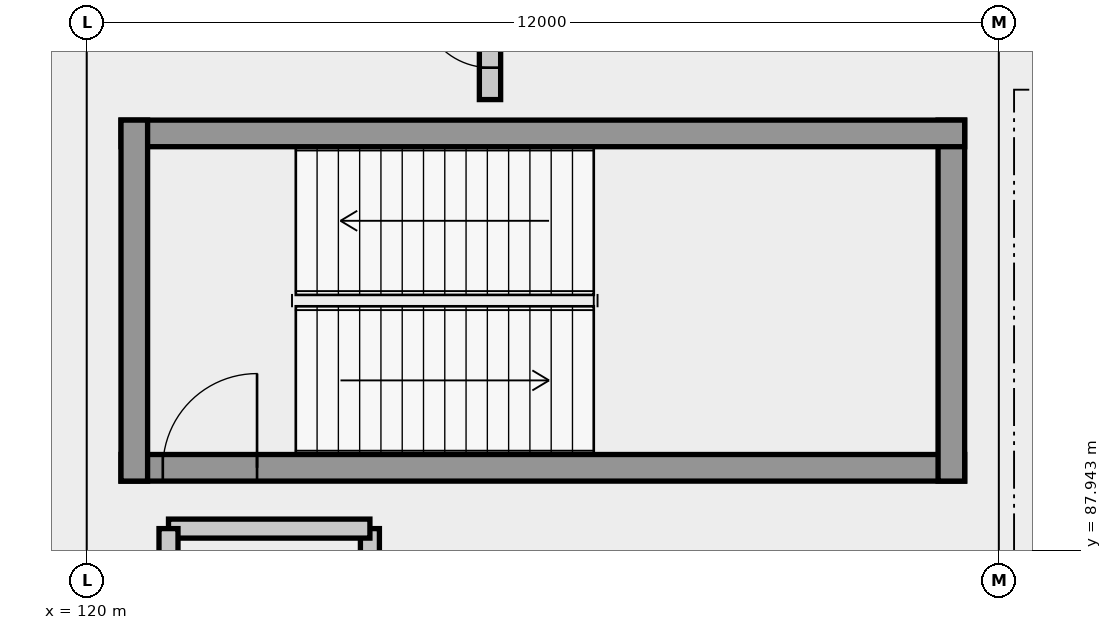
"""IFC4 building model, lengths in metres.
Left out: names, types, materials, properties, quantities, classifications, styles, units other than length and angle.
Written with IfcOpenShell. Run it as: python <this file> out.ifc"""

import sys

from ifc_helpers import new_model, si_unit, direction, frame, frame_2d, origin, place, context, subcontext, project, spatial, rectangle, extrude, element, fill, save


model = new_model("IFC4")
c1 = context("Model", 3, precision=1e-05, world=origin(), true_north=direction((0.0, 1.0)))
c2 = subcontext(c1, "Body", "Model", "MODEL_VIEW")
j1 = project(units=[si_unit("LENGTHUNIT", "METRE"), si_unit("PLANEANGLEUNIT", "RADIAN")], contexts=[c1])
p1 = place(None, origin())
s1 = spatial("IfcSite", under=j1, at=p1, CompositionType="ELEMENT")
p2 = place(p1, origin())
s2 = spatial("IfcBuilding", under=s1, at=p2, CompositionType="ELEMENT")
p3 = place(p2, frame((0.0, 0.0, -5.4)))
s3 = spatial("IfcBuildingStorey", under=s2, at=p3, CompositionType="ELEMENT", Elevation=-5.4)
p4 = place(p3, frame((120.45, 89.025, 0.0), z_axis=(0.0, 0.0, 1.0), x_axis=(1.0, 0.0, 0.0)))
e1 = element("IfcWall", 1, at=p4, inside=s3, PredefinedType="SHEAR", context=c2, shape_type="SweptSolid", body=[
    extrude(rectangle(XDim=11.1, YDim=0.35, at=frame_2d((5.55, 0.0))), origin(), (0.0, 0.0, 1.0), 5.12),
])
p5 = place(p4, frame((0.55, 0.0, 0.0)))
e2 = element("IfcOpeningElement", 2, at=p5, cuts=e1, PredefinedType="OPENING", context=c2, shape_type="SweptSolid", body=[
    extrude(rectangle(XDim=1.24, YDim=2.25, at=frame_2d((0.62, 1.125))), frame((0.0, 0.185, 0.0), z_axis=(0.0, -1.0, 0.0), x_axis=(1.0, 0.0, 0.0)), (0.0, 0.0, 1.0), 0.37),
])
p6 = place(p3, frame((131.375, 88.85, 0.0), z_axis=(0.0, 0.0, 1.0), x_axis=(0.0, 1.0, 0.0)))
e3 = element("IfcWall", 3, at=p6, inside=s3, PredefinedType="SHEAR", context=c2, shape_type="SweptSolid", body=[
    extrude(rectangle(XDim=4.75, YDim=0.35, at=frame_2d((2.375, 0.0))), origin(), (0.0, 0.0, 1.0), 5.12),
])
p7 = place(p3, frame((131.55, 93.425, 0.0), z_axis=(0.0, 0.0, 1.0), x_axis=(-1.0, 0.0, 0.0)))
e4 = element("IfcWall", 4, at=p7, inside=s3, PredefinedType="SHEAR", context=c2, shape_type="SweptSolid", body=[
    extrude(rectangle(XDim=11.1, YDim=0.35, at=frame_2d((5.55, 0.0))), origin(), (0.0, 0.0, 1.0), 5.12),
])
p8 = place(p3, frame((120.625, 93.6, 0.0), z_axis=(0.0, 0.0, 1.0), x_axis=(0.0, -1.0, 0.0)))
e5 = element("IfcWall", 5, at=p8, inside=s3, PredefinedType="SHEAR", context=c2, shape_type="SweptSolid", body=[
    extrude(rectangle(XDim=4.75, YDim=0.35, at=frame_2d((2.375, 0.0))), origin(), (0.0, 0.0, 1.0), 5.12),
])
p9 = place(p3, frame((123.725, 84.775, 0.0), z_axis=(0.0, 0.0, 1.0), x_axis=(0.0, 1.0, 0.0)))
e6 = element("IfcWall", 6, at=p9, inside=s3, PredefinedType="SOLIDWALL", context=c2, shape_type="SweptSolid", body=[
    extrude(rectangle(XDim=3.45, YDim=0.25, at=frame_2d((1.725, 0.0))), origin(), (0.0, 0.0, 1.0), 5.12),
])
p10 = place(p9, frame((1.1, 0.0, 0.0)))
e7 = element("IfcOpeningElement", 7, at=p10, cuts=e6, PredefinedType="OPENING", context=c2, shape_type="SweptSolid", body=[
    extrude(rectangle(XDim=1.25, YDim=2.25, at=frame_2d((0.625, 1.125))), frame((0.0, 0.135, 0.0), z_axis=(0.0, -1.0, 0.0), x_axis=(1.0, 0.0, 0.0)), (0.0, 0.0, 1.0), 0.27),
])
p11 = place(p3, frame((123.725, 88.225, 0.0), z_axis=(0.0, 0.0, 1.0), x_axis=(-1.0, 0.0, 0.0)))
e8 = element("IfcWall", 8, at=p11, inside=s3, PredefinedType="SOLIDWALL", context=c2, shape_type="SweptSolid", body=[
    extrude(rectangle(XDim=2.65, YDim=0.25, at=frame_2d((1.325, 0.0))), origin(), (0.0, 0.0, 1.0), 5.12),
])
p12 = place(p3, frame((121.075, 88.225, 0.0), z_axis=(0.0, 0.0, 1.0), x_axis=(0.0, -1.0, 0.0)))
e9 = element("IfcWall", 9, at=p12, inside=s3, PredefinedType="SOLIDWALL", context=c2, shape_type="SweptSolid", body=[
    extrude(rectangle(XDim=3.45, YDim=0.25, at=frame_2d((1.725, 0.0))), origin(), (0.0, 0.0, 1.0), 5.12),
])
p13 = place(p3, frame((125.305, 93.87, 0.0), z_axis=(0.0, 0.0, 1.0), x_axis=(0.0, 1.0, 0.0)))
e10 = element("IfcWall", 10, at=p13, inside=s3, PredefinedType="SOLIDWALL", context=c2, shape_type="SweptSolid", body=[
    extrude(rectangle(XDim=1.8, YDim=0.28, at=frame_2d((0.9, 0.0))), origin(), (0.0, 0.0, 1.0), 5.1),
])
p14 = place(p13, frame((0.42, 0.0, 0.0)))
e11 = element("IfcOpeningElement", 11, at=p14, cuts=e10, PredefinedType="OPENING", context=c2, shape_type="SweptSolid", body=[
    extrude(rectangle(XDim=0.92, YDim=2.15, at=frame_2d((0.46, 1.075))), frame((0.0, 0.15, 0.0), z_axis=(0.0, -1.0, 0.0), x_axis=(1.0, 0.0, 0.0)), (0.0, 0.0, 1.0), 0.3),
])
p15 = place(p5, origin())
e12 = element("IfcDoor", 12, at=p15, inside=s3, OperationType="SINGLE_SWING_RIGHT", PredefinedType="DOOR", context=c2, shape_type="SweptSolid", body=[
    extrude(rectangle(XDim=1.24, YDim=2.25, at=frame_2d((0.62, 1.125))), frame((0.0, 0.025, 0.0), z_axis=(0.0, -1.0, 0.0), x_axis=(1.0, 0.0, 0.0)), (0.0, 0.0, 1.0), 0.05),
])
fill(e2, e12)
p16 = place(p14, origin())
e13 = element("IfcDoor", 13, at=p16, inside=s3, OperationType="SINGLE_SWING_RIGHT", PredefinedType="DOOR", context=c2, shape_type="SweptSolid", body=[
    extrude(rectangle(XDim=0.92, YDim=2.15, at=frame_2d((0.46, 1.075))), frame((0.0, 0.025, 0.0), z_axis=(0.0, -1.0, 0.0), x_axis=(1.0, 0.0, 0.0)), (0.0, 0.0, 1.0), 0.05),
])
fill(e11, e13)
save(model, sys.argv[1])
